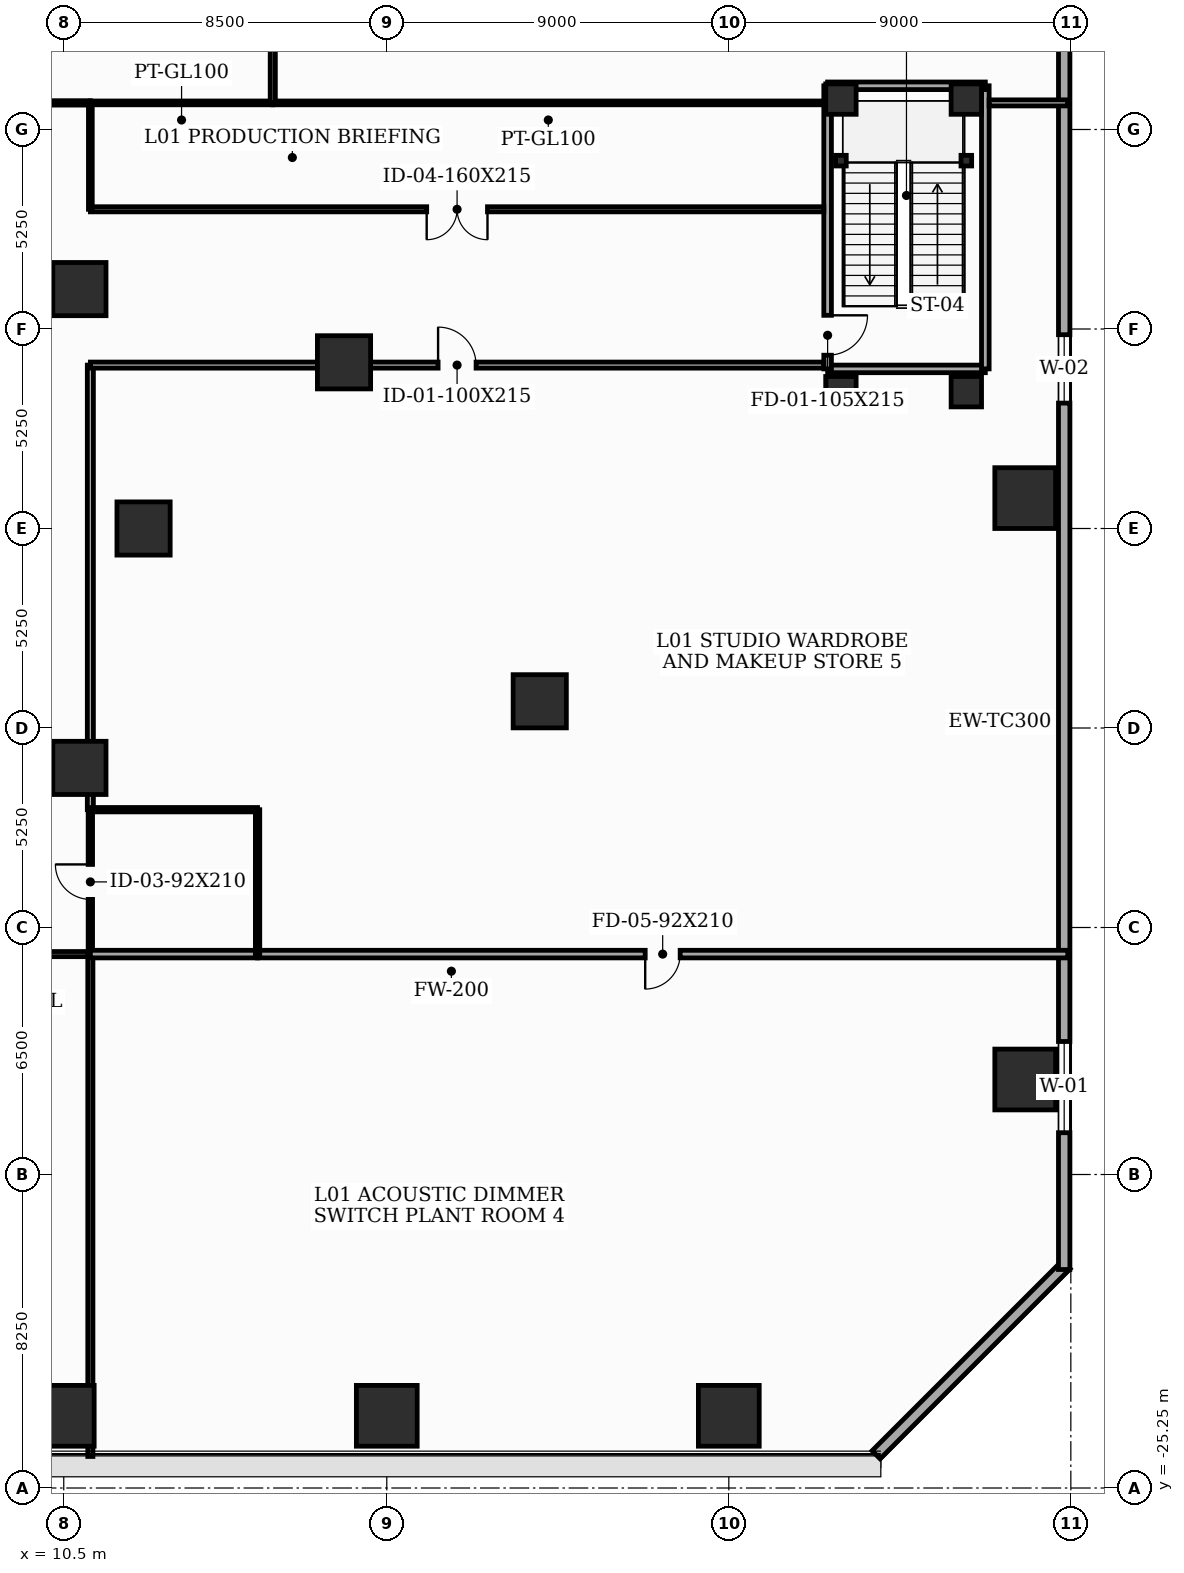
"""IFC4 building model, lengths in metres.
Left out: names, types, materials, properties, quantities, classifications, styles, units other than length and angle.
Written with IfcOpenShell. Run it as: python <this file> out.ifc"""

import sys

from ifc_helpers import new_model, si_unit, direction, frame, frame_2d, origin, origin_2d, place, context, subcontext, project, spatial, rectangle, i_section, extrude, element, fill, save


model = new_model("IFC4")
c1 = context("Model", 3, precision=1e-05, world=origin(), true_north=direction((0.0, 1.0)))
c2 = subcontext(c1, "Body", "Model", "MODEL_VIEW")
j1 = project(units=[si_unit("LENGTHUNIT", "METRE"), si_unit("PLANEANGLEUNIT", "RADIAN")], contexts=[c1])
p1 = place(None, origin())
s1 = spatial("IfcSite", under=j1, at=p1, CompositionType="ELEMENT")
p2 = place(p1, origin())
s2 = spatial("IfcBuilding", under=s1, at=p2, CompositionType="ELEMENT")
p3 = place(p2, frame((0.0, 0.0, 5.2)))
s3 = spatial("IfcBuildingStorey", under=s2, at=p3, CompositionType="ELEMENT", Elevation=5.2)
for number, where, z_axis, x_axis in (
    (1, (12.6, 0.0, 0.0), (0.0, 0.0, 1.0), (1.0, 0.0, 0.0)),
    (2, (10.912, 6.3, 0.0), (0.0, 0.0, 1.0), (1.0, 0.0, 0.0)),
    (3, (10.912, -6.3, 0.0), (0.0, 0.0, 1.0), (1.0, 0.0, 0.0)),
):
    element("IfcColumn", number, at=place(p3, frame(where, z_axis=z_axis, x_axis=x_axis)), inside=s3, PredefinedType="COLUMN", context=c2, shape_type="SweptSolid", body=[
        extrude(rectangle(XDim=1.4, YDim=1.4, at=origin_2d()), origin(), (0.0, 0.0, 1.0), 5.2),
    ])
for number, where, z_axis, x_axis in (
    (4, (10.5, -23.35, 0.0), (0.0, 0.0, 1.0), (1.0, 0.0, 0.0)),
    (5, (19.0, -23.35, 0.0), (0.0, 0.0, 1.0), (1.0, 0.0, 0.0)),
    (6, (28.0, -23.35, 0.0), (0.0, 0.0, 1.0), (1.0, 0.0, 0.0)),
    (7, (35.8, -14.5, 0.0), (0.0, 0.0, 1.0), (1.0, 0.0, 0.0)),
    (8, (35.8, 0.8, 0.0), (0.0, 0.0, 1.0), (1.0, 0.0, 0.0)),
):
    element("IfcColumn", number, at=place(p3, frame(where, z_axis=z_axis, x_axis=x_axis)), inside=s3, PredefinedType="COLUMN", context=c2, shape_type="SweptSolid", body=[
        extrude(rectangle(XDim=1.6, YDim=1.6, at=origin_2d()), origin(), (0.0, 0.0, 1.0), 5.2),
    ])
for number, where, z_axis, x_axis in (
    (9, (23.025, -4.547, 0.0), (0.0, 0.0, 1.0), (1.0, 0.0, 0.0)),
    (10, (17.875, 4.373, 0.0), (0.0, 0.0, 1.0), (1.0, 0.0, 0.0)),
):
    element("IfcColumn", number, at=place(p3, frame(where, z_axis=z_axis, x_axis=x_axis)), inside=s3, PredefinedType="COLUMN", context=c2, shape_type="SweptSolid", body=[
        extrude(rectangle(XDim=1.4, YDim=1.4, at=origin_2d()), origin(), (0.0, 0.0, 1.0), 5.2),
    ])
for number, where, z_axis, x_axis in (
    (11, (30.95, 3.6, 0.0), (0.0, 0.0, 1.0), (1.0, 0.0, 0.0)),
    (12, (34.25, 3.6, 0.0), (0.0, 0.0, 1.0), (1.0, 0.0, 0.0)),
    (13, (34.25, 11.3, 0.0), (0.0, 0.0, 1.0), (1.0, 0.0, 0.0)),
    (14, (30.95, 11.3, 0.0), (0.0, 0.0, 1.0), (1.0, 0.0, 0.0)),
):
    element("IfcColumn", number, at=place(p3, frame(where, z_axis=z_axis, x_axis=x_axis)), inside=s3, PredefinedType="COLUMN", context=c2, shape_type="SweptSolid", body=[
        extrude(rectangle(XDim=0.8, YDim=0.8, at=origin_2d()), origin(), (0.0, 0.0, 1.0), 5.2),
    ])
for number, where, z_axis, x_axis in (
    (15, (30.95, 9.68, 0.0), (0.0, 0.0, 1.0), (1.0, 0.0, 0.0)),
    (16, (34.25, 9.68, 0.0), (0.0, 0.0, 1.0), (1.0, 0.0, 0.0)),
):
    element("IfcColumn", number, at=place(p3, frame(where, z_axis=z_axis, x_axis=x_axis)), inside=s3, PredefinedType="PILASTER", context=c2, shape_type="SweptSolid", body=[
        extrude(i_section(OverallWidth=0.28, OverallDepth=0.28, WebThickness=0.01, FlangeThickness=0.018, at=origin_2d()), origin(), (0.0, 0.0, 1.0), 5.2),
    ])
p4 = place(p3, frame((31.876, -24.376, 0.0), z_axis=(0.0, 0.0, 1.0), x_axis=(0.707106781187, 0.707106781187, 0.0)))
e17 = element("IfcWall", 17, at=p4, inside=s3, PredefinedType="SOLIDWALL", context=c2, shape_type="SweptSolid", body=[
    extrude(rectangle(XDim=7.071, YDim=0.3, at=frame_2d((3.536, 0.0))), origin(), (0.0, 0.0, 1.0), 4.95),
])
p5 = place(p3, frame((36.825, -19.5, 0.0), z_axis=(0.0, 0.0, 1.0), x_axis=(0.0, 1.0, 0.0)))
e18 = element("IfcWall", 18, at=p5, inside=s3, PredefinedType="SOLIDWALL", context=c2, shape_type="SweptSolid", body=[
    extrude(rectangle(XDim=48.0, YDim=0.3, at=frame_2d((24.0, 0.0))), origin(), (0.0, 0.0, 1.0), 4.95),
])
p6 = place(p5, frame((3.6, 0.0, 0.9)))
e19 = element("IfcOpeningElement", 19, at=p6, cuts=e18, PredefinedType="OPENING", context=c2, shape_type="SweptSolid", body=[
    extrude(rectangle(XDim=2.4, YDim=1.35, at=frame_2d((1.2, 0.675))), frame((0.0, 0.16, 0.0), z_axis=(0.0, -1.0, 0.0), x_axis=(1.0, 0.0, 0.0)), (0.0, 0.0, 1.0), 0.32),
])
p7 = place(p5, frame((22.8, 0.0, 0.9)))
e20 = element("IfcOpeningElement", 20, at=p7, cuts=e18, PredefinedType="OPENING", context=c2, shape_type="SweptSolid", body=[
    extrude(rectangle(XDim=1.8, YDim=1.35, at=frame_2d((0.9, 0.675))), frame((0.0, 0.16, 0.0), z_axis=(0.0, -1.0, 0.0), x_axis=(1.0, 0.0, 0.0)), (0.0, 0.0, 1.0), 0.32),
])
p8 = place(p5, frame((33.8, 0.0, 0.9)))
e21 = element("IfcOpeningElement", 21, at=p8, cuts=e18, PredefinedType="OPENING", context=c2, shape_type="SweptSolid", body=[
    extrude(rectangle(XDim=2.4, YDim=1.35, at=frame_2d((1.2, 0.675))), frame((0.0, 0.16, 0.0), z_axis=(0.0, -1.0, 0.0), x_axis=(1.0, 0.0, 0.0)), (0.0, 0.0, 1.0), 0.32),
])
p9 = place(p3, frame((30.6, 4.2, 0.0), z_axis=(0.0, 0.0, 1.0), x_axis=(1.0, 0.0, 0.0)))
e22 = element("IfcWall", 22, at=p9, inside=s3, PredefinedType="SOLIDWALL", context=c2, shape_type="SweptSolid", body=[
    extrude(rectangle(XDim=4.15, YDim=0.2, at=frame_2d((2.075, 0.0))), origin(), (0.0, 0.0, 1.0), 4.95),
])
p10 = place(p3, frame((34.75, 4.2, 0.0), z_axis=(0.0, 0.0, 1.0), x_axis=(0.0, 1.0, 0.0)))
e23 = element("IfcWall", 23, at=p10, inside=s3, PredefinedType="SOLIDWALL", context=c2, shape_type="SweptSolid", body=[
    extrude(rectangle(XDim=7.45, YDim=0.2, at=frame_2d((3.725, 0.0))), origin(), (0.0, 0.0, 1.0), 4.95),
])
p11 = place(p3, frame((34.75, 11.65, 0.0), z_axis=(0.0, 0.0, 1.0), x_axis=(-1.0, 0.0, 0.0)))
e24 = element("IfcWall", 24, at=p11, inside=s3, PredefinedType="SOLIDWALL", context=c2, shape_type="SweptSolid", body=[
    extrude(rectangle(XDim=4.15, YDim=0.2, at=frame_2d((2.075, 0.0))), origin(), (0.0, 0.0, 1.0), 4.95),
])
p12 = place(p3, frame((30.6, 11.65, 0.0), z_axis=(0.0, 0.0, 1.0), x_axis=(0.0, -1.0, 0.0)))
e25 = element("IfcWall", 25, at=p12, inside=s3, PredefinedType="SOLIDWALL", context=c2, shape_type="SweptSolid", body=[
    extrude(rectangle(XDim=7.45, YDim=0.2, at=frame_2d((3.725, 0.0))), origin(), (0.0, 0.0, 1.0), 4.95),
])
p13 = place(p12, frame((6.04, 0.0, 0.0)))
e26 = element("IfcOpeningElement", 26, at=p13, cuts=e25, PredefinedType="OPENING", context=c2, shape_type="SweptSolid", body=[
    extrude(rectangle(XDim=1.05, YDim=2.15, at=frame_2d((0.525, 1.075))), frame((0.0, 0.11, 0.0), z_axis=(0.0, -1.0, 0.0), x_axis=(1.0, 0.0, 0.0)), (0.0, 0.0, 1.0), 0.22),
])
p14 = place(p3, frame((-11.2, -11.2, 0.0), z_axis=(0.0, 0.0, 1.0), x_axis=(1.0, 0.0, 0.0)))
e27 = element("IfcWall", 27, at=p14, inside=s3, PredefinedType="PARTITIONING", context=c2, shape_type="SweptSolid", body=[
    extrude(rectangle(XDim=22.4, YDim=0.135, at=frame_2d((11.2, 0.0))), origin(), (0.0, 0.0, 1.0), 3.435),
])
p15 = place(p14, frame((8.037, 0.0, 0.0)))
e28 = element("IfcOpeningElement", 28, at=p15, cuts=e27, PredefinedType="OPENING", context=c2, shape_type="SweptSolid", body=[
    extrude(rectangle(XDim=0.95, YDim=2.1, at=frame_2d((0.475, 1.05))), frame((0.0, 0.077, 0.0), z_axis=(0.0, -1.0, 0.0), x_axis=(1.0, 0.0, 0.0)), (0.0, 0.0, 1.0), 0.155),
])
p16 = place(p3, frame((11.2, -11.2, 0.0), z_axis=(0.0, 0.0, 1.0), x_axis=(0.0, 1.0, 0.0)))
e29 = element("IfcWall", 29, at=p16, inside=s3, PredefinedType="PARTITIONING", context=c2, shape_type="SweptSolid", body=[
    extrude(rectangle(XDim=3.8, YDim=0.115, at=frame_2d((1.9, 0.0))), origin(), (0.0, 0.0, 1.0), 4.95),
])
p17 = place(p16, frame((1.44, 0.0, 0.0)))
e30 = element("IfcOpeningElement", 30, at=p17, cuts=e29, PredefinedType="OPENING", context=c2, shape_type="SweptSolid", body=[
    extrude(rectangle(XDim=0.92, YDim=2.1, at=frame_2d((0.46, 1.05))), frame((0.0, 0.067, 0.0), z_axis=(0.0, -1.0, 0.0), x_axis=(1.0, 0.0, 0.0)), (0.0, 0.0, 1.0), 0.135),
])
p18 = place(p3, frame((11.2, -7.4, 0.0), z_axis=(0.0, 0.0, 1.0), x_axis=(0.0, 1.0, 0.0)))
e31 = element("IfcWall", 31, at=p18, inside=s3, PredefinedType="PARTITIONING", context=c2, shape_type="SweptSolid", body=[
    extrude(rectangle(XDim=11.7, YDim=0.16, at=frame_2d((5.85, 0.0))), origin(), (0.0, 0.0, 1.0), 4.235),
])
p19 = place(p3, frame((11.2, 4.3, 0.0), z_axis=(0.0, 0.0, 1.0), x_axis=(1.0, 0.0, 0.0)))
e32 = element("IfcWall", 32, at=p19, inside=s3, PredefinedType="PARTITIONING", context=c2, shape_type="SweptSolid", body=[
    extrude(rectangle(XDim=19.3, YDim=0.16, at=frame_2d((9.65, 0.0))), origin(), (0.0, 0.0, 1.0), 3.435),
])
p20 = place(p19, frame((9.15, 0.0, 0.0)))
e33 = element("IfcOpeningElement", 33, at=p20, cuts=e32, PredefinedType="OPENING", context=c2, shape_type="SweptSolid", body=[
    extrude(rectangle(XDim=1.0, YDim=2.15, at=frame_2d((0.5, 1.075))), frame((0.0, 0.09, 0.0), z_axis=(0.0, -1.0, 0.0), x_axis=(1.0, 0.0, 0.0)), (0.0, 0.0, 1.0), 0.18),
])
p21 = place(p3, frame((30.5, 8.4, 0.0), z_axis=(0.0, 0.0, 1.0), x_axis=(-1.0, 0.0, 0.0)))
e34 = element("IfcWall", 34, at=p21, inside=s3, PredefinedType="PARTITIONING", context=c2, shape_type="SweptSolid", body=[
    extrude(rectangle(XDim=19.3, YDim=0.135, at=frame_2d((9.65, 0.0))), origin(), (0.0, 0.0, 1.0), 4.235),
])
p22 = place(p21, frame((8.85, 0.0, 0.0)))
e35 = element("IfcOpeningElement", 35, at=p22, cuts=e34, PredefinedType="OPENING", context=c2, shape_type="SweptSolid", body=[
    extrude(rectangle(XDim=1.6, YDim=2.15, at=frame_2d((0.8, 1.075))), frame((0.0, 0.077, 0.0), z_axis=(0.0, -1.0, 0.0), x_axis=(1.0, 0.0, 0.0)), (0.0, 0.0, 1.0), 0.155),
])
p23 = place(p3, frame((11.2, 8.4, 0.0), z_axis=(0.0, 0.0, 1.0), x_axis=(0.0, 1.0, 0.0)))
e36 = element("IfcWall", 36, at=p23, inside=s3, PredefinedType="MOVABLE", context=c2, shape_type="SweptSolid", body=[
    extrude(rectangle(XDim=2.8, YDim=0.1, at=frame_2d((1.4, 0.0))), origin(), (0.0, 0.0, 1.0), 4.95),
])
p24 = place(p3, frame((11.2, 11.2, 0.0), z_axis=(0.0, 0.0, 1.0), x_axis=(-1.0, 0.0, 0.0)))
e37 = element("IfcWall", 37, at=p24, inside=s3, PredefinedType="PARTITIONING", context=c2, shape_type="SweptSolid", body=[
    extrude(rectangle(XDim=16.2, YDim=0.115, at=frame_2d((8.1, 0.0))), origin(), (0.0, 0.0, 1.0), 3.435),
])
p25 = place(p24, frame((7.625, 0.0, 0.0)))
e38 = element("IfcOpeningElement", 38, at=p25, cuts=e37, PredefinedType="OPENING", context=c2, shape_type="SweptSolid", body=[
    extrude(rectangle(XDim=0.95, YDim=2.1, at=frame_2d((0.475, 1.05))), frame((0.0, 0.067, 0.0), z_axis=(0.0, -1.0, 0.0), x_axis=(1.0, 0.0, 0.0)), (0.0, 0.0, 1.0), 0.135),
])
p26 = place(p3, frame((11.2, -24.42, 0.0), z_axis=(0.0, 0.0, 1.0), x_axis=(0.0, 1.0, 0.0)))
e39 = element("IfcWall", 39, at=p26, inside=s3, PredefinedType="PARTITIONING", context=c2, shape_type="SweptSolid", body=[
    extrude(rectangle(XDim=13.22, YDim=0.135, at=frame_2d((6.61, 0.0))), origin(), (0.0, 0.0, 1.0), 3.435),
])
p27 = place(p3, frame((15.6, -11.2, 0.0), z_axis=(0.0, 0.0, 1.0), x_axis=(-1.0, 0.0, 0.0)))
e40 = element("IfcWall", 40, at=p27, inside=s3, PredefinedType="SOLIDWALL", context=c2, shape_type="SweptSolid", body=[
    extrude(rectangle(XDim=4.4, YDim=0.2, at=frame_2d((2.2, 0.0))), origin(), (0.0, 0.0, 1.0), 4.95),
])
p28 = place(p3, frame((36.92, -11.2, 0.0), z_axis=(0.0, 0.0, 1.0), x_axis=(-1.0, 0.0, 0.0)))
e41 = element("IfcWall", 41, at=p28, inside=s3, PredefinedType="SOLIDWALL", context=c2, shape_type="SweptSolid", body=[
    extrude(rectangle(XDim=21.32, YDim=0.2, at=frame_2d((10.66, 0.0))), origin(), (0.0, 0.0, 1.0), 3.435),
])
p29 = place(p28, frame((10.2, 0.0, 0.0)))
e42 = element("IfcOpeningElement", 42, at=p29, cuts=e41, PredefinedType="OPENING", context=c2, shape_type="SweptSolid", body=[
    extrude(rectangle(XDim=0.92, YDim=2.1, at=frame_2d((0.46, 1.05))), frame((0.0, 0.11, 0.0), z_axis=(0.0, -1.0, 0.0), x_axis=(1.0, 0.0, 0.0)), (0.0, 0.0, 1.0), 0.22),
])
p30 = place(p3, frame((15.6, -11.2, 0.0), z_axis=(0.0, 0.0, 1.0), x_axis=(0.0, 1.0, 0.0)))
e43 = element("IfcWall", 43, at=p30, inside=s3, PredefinedType="PARTITIONING", context=c2, shape_type="SweptSolid", body=[
    extrude(rectangle(XDim=3.8, YDim=0.115, at=frame_2d((1.9, 0.0))), origin(), (0.0, 0.0, 1.0), 4.95),
])
p31 = place(p3, frame((15.6, -7.4, 0.0), z_axis=(0.0, 0.0, 1.0), x_axis=(-1.0, 0.0, 0.0)))
e44 = element("IfcWall", 44, at=p31, inside=s3, PredefinedType="PARTITIONING", context=c2, shape_type="SweptSolid", body=[
    extrude(rectangle(XDim=4.4, YDim=0.115, at=frame_2d((2.2, 0.0))), origin(), (0.0, 0.0, 1.0), 4.95),
])
p32 = place(p3, frame((36.92, 11.2, 0.0), z_axis=(0.0, 0.0, 1.0), x_axis=(-1.0, 0.0, 0.0)))
e45 = element("IfcWall", 45, at=p32, inside=s3, PredefinedType="PARTITIONING", context=c2, shape_type="SweptSolid", body=[
    extrude(rectangle(XDim=2.07, YDim=0.16, at=frame_2d((1.035, 0.0))), origin(), (0.0, 0.0, 1.0), 4.235),
])
p33 = place(p3, frame((30.5, 11.2, 0.0), z_axis=(0.0, 0.0, 1.0), x_axis=(-1.0, 0.0, 0.0)))
e46 = element("IfcWall", 46, at=p33, inside=s3, PredefinedType="MOVABLE", context=c2, shape_type="SweptSolid", body=[
    extrude(rectangle(XDim=14.5, YDim=0.1, at=frame_2d((7.25, 0.0))), origin(), (0.0, 0.0, 1.0), 4.95),
])
p34 = place(p3, frame((16.0, 11.2, 0.0), z_axis=(0.0, 0.0, 1.0), x_axis=(-1.0, 0.0, 0.0)))
e47 = element("IfcWall", 47, at=p34, inside=s3, PredefinedType="MOVABLE", context=c2, shape_type="SweptSolid", body=[
    extrude(rectangle(XDim=4.8, YDim=0.1, at=frame_2d((2.4, 0.0))), origin(), (0.0, 0.0, 1.0), 4.235),
])
p35 = place(p3, frame((16.0, 33.42, 0.0), z_axis=(0.0, 0.0, 1.0), x_axis=(0.0, -1.0, 0.0)))
e48 = element("IfcWall", 48, at=p35, inside=s3, PredefinedType="PARTITIONING", context=c2, shape_type="SweptSolid", body=[
    extrude(rectangle(XDim=22.22, YDim=0.135, at=frame_2d((11.11, 0.0))), origin(), (0.0, 0.0, 1.0), 3.435),
])
p36 = place(p35, frame((10.65, 0.0, 0.0)))
e49 = element("IfcOpeningElement", 49, at=p36, cuts=e48, PredefinedType="OPENING", context=c2, shape_type="SweptSolid", body=[
    extrude(rectangle(XDim=0.92, YDim=2.1, at=frame_2d((0.46, 1.05))), frame((0.0, 0.077, 0.0), z_axis=(0.0, -1.0, 0.0), x_axis=(1.0, 0.0, 0.0)), (0.0, 0.0, 1.0), 0.155),
])
p37 = place(p6, origin())
e50 = element("IfcWindow", 50, at=p37, inside=s3, PartitioningType="SINGLE_PANEL", PredefinedType="WINDOW", context=c2, shape_type="SweptSolid", body=[
    extrude(rectangle(XDim=2.4, YDim=1.35, at=frame_2d((1.2, 0.675))), frame((0.0, 0.03, 0.0), z_axis=(0.0, -1.0, 0.0), x_axis=(1.0, 0.0, 0.0)), (0.0, 0.0, 1.0), 0.06),
])
fill(e19, e50)
p38 = place(p7, origin())
e51 = element("IfcWindow", 51, at=p38, inside=s3, PartitioningType="SINGLE_PANEL", PredefinedType="WINDOW", context=c2, shape_type="SweptSolid", body=[
    extrude(rectangle(XDim=1.8, YDim=1.35, at=frame_2d((0.9, 0.675))), frame((0.0, 0.03, 0.0), z_axis=(0.0, -1.0, 0.0), x_axis=(1.0, 0.0, 0.0)), (0.0, 0.0, 1.0), 0.06),
])
fill(e20, e51)
p39 = place(p13, origin())
e52 = element("IfcDoor", 52, at=p39, inside=s3, OperationType="SINGLE_SWING_LEFT", PredefinedType="DOOR", context=c2, shape_type="SweptSolid", body=[
    extrude(rectangle(XDim=1.05, YDim=2.15, at=frame_2d((0.525, 1.075))), frame((0.0, 0.025, 0.0), z_axis=(0.0, -1.0, 0.0), x_axis=(1.0, 0.0, 0.0)), (0.0, 0.0, 1.0), 0.05),
])
fill(e26, e52)
p40 = place(p17, origin())
e53 = element("IfcDoor", 53, at=p40, inside=s3, OperationType="SINGLE_SWING_RIGHT", PredefinedType="DOOR", context=c2, shape_type="SweptSolid", body=[
    extrude(rectangle(XDim=0.92, YDim=2.1, at=frame_2d((0.46, 1.05))), frame((0.0, 0.025, 0.0), z_axis=(0.0, -1.0, 0.0), x_axis=(1.0, 0.0, 0.0)), (0.0, 0.0, 1.0), 0.05),
])
fill(e30, e53)
p41 = place(p20, origin())
e54 = element("IfcDoor", 54, at=p41, inside=s3, OperationType="SINGLE_SWING_LEFT", PredefinedType="DOOR", context=c2, shape_type="SweptSolid", body=[
    extrude(rectangle(XDim=1.0, YDim=2.15, at=frame_2d((0.5, 1.075))), frame((0.0, 0.025, 0.0), z_axis=(0.0, -1.0, 0.0), x_axis=(1.0, 0.0, 0.0)), (0.0, 0.0, 1.0), 0.05),
])
fill(e33, e54)
p42 = place(p22, origin())
e55 = element("IfcDoor", 55, at=p42, inside=s3, OperationType="DOUBLE_DOOR_SINGLE_SWING", PredefinedType="DOOR", context=c2, shape_type="SweptSolid", body=[
    extrude(rectangle(XDim=1.6, YDim=2.15, at=frame_2d((0.8, 1.075))), frame((0.0, 0.025, 0.0), z_axis=(0.0, -1.0, 0.0), x_axis=(1.0, 0.0, 0.0)), (0.0, 0.0, 1.0), 0.05),
])
fill(e35, e55)
p43 = place(p29, origin())
e56 = element("IfcDoor", 56, at=p43, inside=s3, OperationType="SINGLE_SWING_RIGHT", PredefinedType="DOOR", context=c2, shape_type="SweptSolid", body=[
    extrude(rectangle(XDim=0.92, YDim=2.1, at=frame_2d((0.46, 1.05))), frame((0.0, 0.025, 0.0), z_axis=(0.0, -1.0, 0.0), x_axis=(1.0, 0.0, 0.0)), (0.0, 0.0, 1.0), 0.05),
])
fill(e42, e56)
save(model, sys.argv[1])
